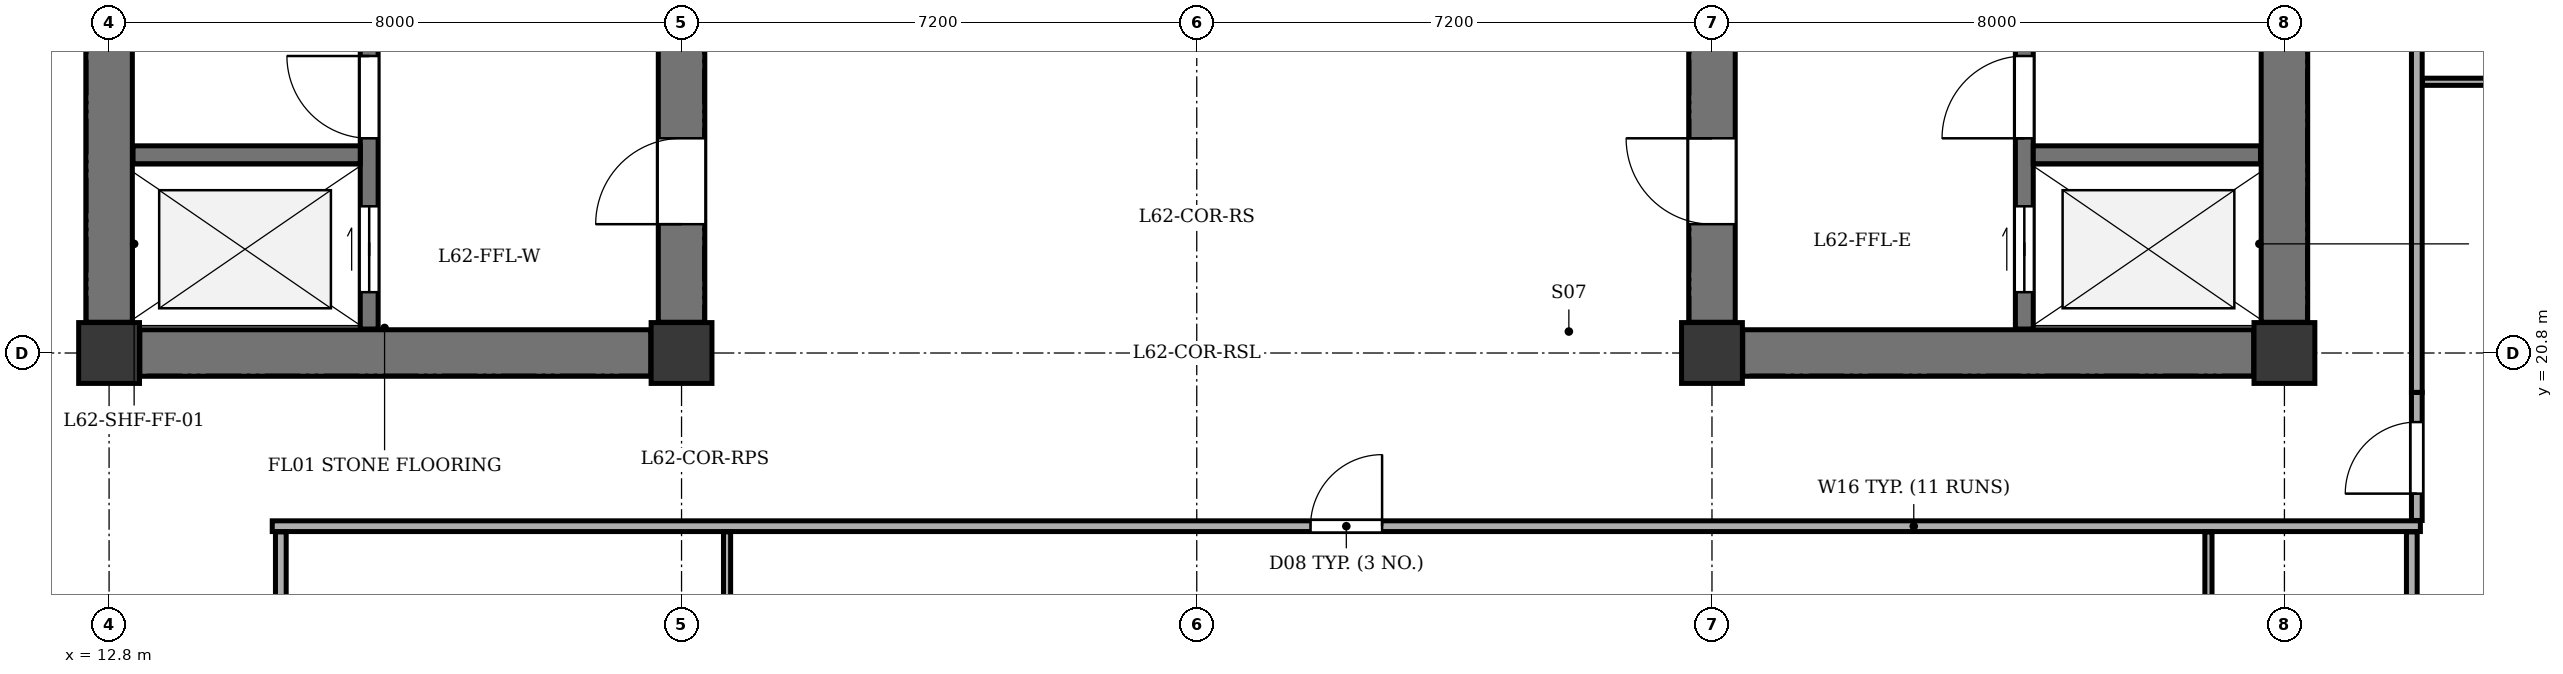
"""IFC4 building model, lengths in metres.
Left out: names, types, materials, properties, quantities, classifications, styles, units other than length and angle.
Written with IfcOpenShell. Run it as: python <this file> out.ifc"""

import sys

from ifc_helpers import new_model, si_unit, direction, frame, frame_2d, origin, origin_2d, place, context, subcontext, project, spatial, rectangle, extrude, element, fill, save


model = new_model("IFC4")
c1 = context("Model", 3, precision=1e-05, world=origin(), true_north=direction((0.0, 1.0)))
c2 = subcontext(c1, "Body", "Model", "MODEL_VIEW")
j1 = project(units=[si_unit("LENGTHUNIT", "METRE"), si_unit("PLANEANGLEUNIT", "RADIAN")], contexts=[c1])
p1 = place(None, origin())
s1 = spatial("IfcSite", under=j1, at=p1, CompositionType="ELEMENT")
p2 = place(p1, origin())
s2 = spatial("IfcBuilding", under=s1, at=p2, CompositionType="ELEMENT")
p3 = place(p2, frame((0.0, 0.0, 238.1)))
s3 = spatial("IfcBuildingStorey", under=s2, at=p3, CompositionType="ELEMENT", Elevation=238.1)
for number, where, z_axis, x_axis in (
    (1, (12.8, 20.8, 0.0), (0.0, 0.0, 1.0), (1.0, 0.0, 0.0)),
    (2, (20.8, 20.8, 0.0), (0.0, 0.0, 1.0), (1.0, 0.0, 0.0)),
    (3, (35.2, 20.8, 0.0), (0.0, 0.0, 1.0), (1.0, 0.0, 0.0)),
    (4, (43.2, 20.8, 0.0), (0.0, 0.0, 1.0), (1.0, 0.0, 0.0)),
):
    element("IfcColumn", number, at=place(p3, frame(where, z_axis=z_axis, x_axis=x_axis)), inside=s3, PredefinedType="COLUMN", context=c2, shape_type="SweptSolid", body=[
        extrude(rectangle(XDim=0.85, YDim=0.85, at=origin_2d()), origin(), (0.0, 0.0, 1.0), 3.4),
    ])
p4 = place(p3, frame((12.8, 21.23, 0.0), z_axis=(0.0, 0.0, 1.0), x_axis=(0.0, 1.0, 0.0)))
e5 = element("IfcWall", 5, at=p4, inside=s3, PredefinedType="SHEAR", context=c2, shape_type="SweptSolid", body=[
    extrude(rectangle(XDim=11.94, YDim=0.65, at=frame_2d((5.97, 0.0))), origin(), (0.0, 0.0, 1.0), 3.1),
])
p5 = place(p3, frame((13.23, 20.8, 0.0), z_axis=(0.0, 0.0, 1.0), x_axis=(1.0, 0.0, 0.0)))
e6 = element("IfcWall", 6, at=p5, inside=s3, PredefinedType="SHEAR", context=c2, shape_type="SweptSolid", body=[
    extrude(rectangle(XDim=7.14, YDim=0.65, at=frame_2d((3.57, 0.0))), origin(), (0.0, 0.0, 1.0), 3.1),
])
p6 = place(p3, frame((20.8, 21.23, 0.0), z_axis=(0.0, 0.0, 1.0), x_axis=(0.0, 1.0, 0.0)))
e7 = element("IfcWall", 7, at=p6, inside=s3, PredefinedType="SHEAR", context=c2, shape_type="SweptSolid", body=[
    extrude(rectangle(XDim=3.82, YDim=0.65, at=frame_2d((1.91, 0.0))), origin(), (0.0, 0.0, 1.0), 3.1),
])
p7 = place(p6, frame((1.37, 0.0, 0.0)))
e8 = element("IfcOpeningElement", 8, at=p7, cuts=e7, PredefinedType="OPENING", context=c2, shape_type="SweptSolid", body=[
    extrude(rectangle(XDim=1.2, YDim=2.15, at=frame_2d((0.6, 1.075))), frame((0.0, 0.335, 0.0), z_axis=(0.0, -1.0, 0.0), x_axis=(1.0, 0.0, 0.0)), (0.0, 0.0, 1.0), 0.67),
])
p8 = place(p3, frame((16.435, 21.135, 0.0), z_axis=(0.0, 0.0, 1.0), x_axis=(0.0, 1.0, 0.0)))
e9 = element("IfcWall", 9, at=p8, inside=s3, PredefinedType="SHEAR", context=c2, shape_type="SweptSolid", body=[
    extrude(rectangle(XDim=12.13, YDim=0.25, at=frame_2d((6.065, 0.0))), origin(), (0.0, 0.0, 1.0), 3.1),
])
p9 = place(p8, frame((0.515, 0.0, 0.0)))
e10 = element("IfcOpeningElement", 10, at=p9, cuts=e9, PredefinedType="OPENING", context=c2, shape_type="SweptSolid", body=[
    extrude(rectangle(XDim=1.2, YDim=2.15, at=frame_2d((0.6, 1.075))), frame((0.0, 0.135, 0.0), z_axis=(0.0, -1.0, 0.0), x_axis=(1.0, 0.0, 0.0)), (0.0, 0.0, 1.0), 0.27),
])
p10 = place(p8, frame((2.665, 0.0, 0.0)))
e11 = element("IfcOpeningElement", 11, at=p10, cuts=e9, PredefinedType="OPENING", context=c2, shape_type="SweptSolid", body=[
    extrude(rectangle(XDim=1.15, YDim=2.15, at=frame_2d((0.575, 1.075))), frame((0.0, 0.135, 0.0), z_axis=(0.0, -1.0, 0.0), x_axis=(1.0, 0.0, 0.0)), (0.0, 0.0, 1.0), 0.27),
])
p11 = place(p3, frame((13.135, 23.57, 0.0), z_axis=(0.0, 0.0, 1.0), x_axis=(1.0, 0.0, 0.0)))
e12 = element("IfcWall", 12, at=p11, inside=s3, PredefinedType="SHEAR", context=c2, shape_type="SweptSolid", body=[
    extrude(rectangle(XDim=3.175, YDim=0.25, at=frame_2d((1.587, 0.0))), origin(), (0.0, 0.0, 1.0), 3.1),
])
p12 = place(p3, frame((43.2, 21.23, 0.0), z_axis=(0.0, 0.0, 1.0), x_axis=(0.0, 1.0, 0.0)))
e13 = element("IfcWall", 13, at=p12, inside=s3, PredefinedType="SHEAR", context=c2, shape_type="SweptSolid", body=[
    extrude(rectangle(XDim=11.94, YDim=0.65, at=frame_2d((5.97, 0.0))), origin(), (0.0, 0.0, 1.0), 3.1),
])
p13 = place(p3, frame((35.63, 20.8, 0.0), z_axis=(0.0, 0.0, 1.0), x_axis=(1.0, 0.0, 0.0)))
e14 = element("IfcWall", 14, at=p13, inside=s3, PredefinedType="SHEAR", context=c2, shape_type="SweptSolid", body=[
    extrude(rectangle(XDim=7.14, YDim=0.65, at=frame_2d((3.57, 0.0))), origin(), (0.0, 0.0, 1.0), 3.1),
])
p14 = place(p3, frame((35.2, 21.23, 0.0), z_axis=(0.0, 0.0, 1.0), x_axis=(0.0, 1.0, 0.0)))
e15 = element("IfcWall", 15, at=p14, inside=s3, PredefinedType="SHEAR", context=c2, shape_type="SweptSolid", body=[
    extrude(rectangle(XDim=3.82, YDim=0.65, at=frame_2d((1.91, 0.0))), origin(), (0.0, 0.0, 1.0), 3.1),
])
p15 = place(p14, frame((1.37, 0.0, 0.0)))
e16 = element("IfcOpeningElement", 16, at=p15, cuts=e15, PredefinedType="OPENING", context=c2, shape_type="SweptSolid", body=[
    extrude(rectangle(XDim=1.2, YDim=2.15, at=frame_2d((0.6, 1.075))), frame((0.0, 0.335, 0.0), z_axis=(0.0, -1.0, 0.0), x_axis=(1.0, 0.0, 0.0)), (0.0, 0.0, 1.0), 0.67),
])
p16 = place(p3, frame((39.565, 21.135, 0.0), z_axis=(0.0, 0.0, 1.0), x_axis=(0.0, 1.0, 0.0)))
e17 = element("IfcWall", 17, at=p16, inside=s3, PredefinedType="SHEAR", context=c2, shape_type="SweptSolid", body=[
    extrude(rectangle(XDim=12.13, YDim=0.25, at=frame_2d((6.065, 0.0))), origin(), (0.0, 0.0, 1.0), 3.1),
])
p17 = place(p16, frame((0.515, 0.0, 0.0)))
e18 = element("IfcOpeningElement", 18, at=p17, cuts=e17, PredefinedType="OPENING", context=c2, shape_type="SweptSolid", body=[
    extrude(rectangle(XDim=1.2, YDim=2.15, at=frame_2d((0.6, 1.075))), frame((0.0, 0.135, 0.0), z_axis=(0.0, -1.0, 0.0), x_axis=(1.0, 0.0, 0.0)), (0.0, 0.0, 1.0), 0.27),
])
p18 = place(p16, frame((2.665, 0.0, 0.0)))
e19 = element("IfcOpeningElement", 19, at=p18, cuts=e17, PredefinedType="OPENING", context=c2, shape_type="SweptSolid", body=[
    extrude(rectangle(XDim=1.15, YDim=2.15, at=frame_2d((0.575, 1.075))), frame((0.0, 0.135, 0.0), z_axis=(0.0, -1.0, 0.0), x_axis=(1.0, 0.0, 0.0)), (0.0, 0.0, 1.0), 0.27),
])
p19 = place(p3, frame((39.69, 23.57, 0.0), z_axis=(0.0, 0.0, 1.0), x_axis=(1.0, 0.0, 0.0)))
e20 = element("IfcWall", 20, at=p19, inside=s3, PredefinedType="SHEAR", context=c2, shape_type="SweptSolid", body=[
    extrude(rectangle(XDim=3.175, YDim=0.25, at=frame_2d((1.587, 0.0))), origin(), (0.0, 0.0, 1.0), 3.1),
])
p20 = place(p3, frame((15.08, 18.38, 0.0), z_axis=(0.0, 0.0, 1.0), x_axis=(1.0, 0.0, 0.0)))
e21 = element("IfcWall", 21, at=p20, inside=s3, PredefinedType="PARTITIONING", context=c2, shape_type="SweptSolid", body=[
    extrude(rectangle(XDim=30.02, YDim=0.15, at=frame_2d((15.01, 0.0))), origin(), (0.0, 0.0, 1.0), 3.1),
])
p21 = place(p20, frame((14.51, 0.0, 0.0)))
e22 = element("IfcOpeningElement", 22, at=p21, cuts=e21, PredefinedType="OPENING", context=c2, shape_type="SweptSolid", body=[
    extrude(rectangle(XDim=1.0, YDim=2.1, at=frame_2d((0.5, 1.05))), frame((0.0, 0.085, 0.0), z_axis=(0.0, -1.0, 0.0), x_axis=(1.0, 0.0, 0.0)), (0.0, 0.0, 1.0), 0.17),
])
p22 = place(p3, frame((15.2, 3.045, 0.0), z_axis=(0.0, 0.0, 1.0), x_axis=(0.0, 1.0, 0.0)))
e23 = element("IfcWall", 23, at=p22, inside=s3, PredefinedType="PARTITIONING", context=c2, shape_type="SweptSolid", body=[
    extrude(rectangle(XDim=15.255, YDim=0.15, at=frame_2d((7.627, 0.0))), origin(), (0.0, 0.0, 1.0), 3.1),
])
p23 = place(p3, frame((42.138, 5.605, 0.0), z_axis=(0.0, 0.0, 1.0), x_axis=(0.0, 1.0, 0.0)))
e24 = element("IfcWall", 24, at=p23, inside=s3, PredefinedType="PARTITIONING", context=c2, shape_type="SweptSolid", body=[
    extrude(rectangle(XDim=12.695, YDim=0.1, at=frame_2d((6.348, 0.0))), origin(), (0.0, 0.0, 1.0), 2.725),
])
p24 = place(p23, frame((5.91, 0.0, 0.0)))
e25 = element("IfcOpeningElement", 25, at=p24, cuts=e24, PredefinedType="OPENING", context=c2, shape_type="SweptSolid", body=[
    extrude(rectangle(XDim=0.9, YDim=2.05, at=frame_2d((0.45, 1.025))), frame((0.0, 0.06, 0.0), z_axis=(0.0, -1.0, 0.0), x_axis=(1.0, 0.0, 0.0)), (0.0, 0.0, 1.0), 0.12),
])
p25 = place(p3, frame((21.436, 5.605, 0.0), z_axis=(0.0, 0.0, 1.0), x_axis=(0.0, 1.0, 0.0)))
e26 = element("IfcWall", 26, at=p25, inside=s3, PredefinedType="PARTITIONING", context=c2, shape_type="SweptSolid", body=[
    extrude(rectangle(XDim=12.695, YDim=0.1, at=frame_2d((6.348, 0.0))), origin(), (0.0, 0.0, 1.0), 3.1),
])
p26 = place(p25, frame((0.605, 0.0, 0.0)))
e27 = element("IfcOpeningElement", 27, at=p26, cuts=e26, PredefinedType="OPENING", context=c2, shape_type="SweptSolid", body=[
    extrude(rectangle(XDim=0.9, YDim=2.05, at=frame_2d((0.45, 1.025))), frame((0.0, 0.06, 0.0), z_axis=(0.0, -1.0, 0.0), x_axis=(1.0, 0.0, 0.0)), (0.0, 0.0, 1.0), 0.12),
])
p27 = place(p3, frame((44.98, 3.045, 0.0), z_axis=(0.0, 0.0, 1.0), x_axis=(0.0, 1.0, 0.0)))
e28 = element("IfcWall", 28, at=p27, inside=s3, PredefinedType="PARTITIONING", context=c2, shape_type="SweptSolid", body=[
    extrude(rectangle(XDim=15.255, YDim=0.15, at=frame_2d((7.627, 0.0))), origin(), (0.0, 0.0, 1.0), 2.725),
])
p28 = place(p3, frame((45.05, 18.46, 0.0), z_axis=(0.0, 0.0, 1.0), x_axis=(0.0, 1.0, 0.0)))
e29 = element("IfcWall", 29, at=p28, inside=s3, PredefinedType="PARTITIONING", context=c2, shape_type="SweptSolid", body=[
    extrude(rectangle(XDim=1.79, YDim=0.15, at=frame_2d((0.895, 0.0))), origin(), (0.0, 0.0, 1.0), 2.725),
])
p29 = place(p28, frame((0.375, 0.0, 0.0)))
e30 = element("IfcOpeningElement", 30, at=p29, cuts=e29, PredefinedType="OPENING", context=c2, shape_type="SweptSolid", body=[
    extrude(rectangle(XDim=1.0, YDim=2.1, at=frame_2d((0.5, 1.05))), frame((0.0, 0.085, 0.0), z_axis=(0.0, -1.0, 0.0), x_axis=(1.0, 0.0, 0.0)), (0.0, 0.0, 1.0), 0.17),
])
p30 = place(p3, frame((45.05, 20.25, 0.0), z_axis=(0.0, 0.0, 1.0), x_axis=(0.0, 1.0, 0.0)))
e31 = element("IfcWall", 31, at=p30, inside=s3, PredefinedType="PARTITIONING", context=c2, shape_type="SweptSolid", body=[
    extrude(rectangle(XDim=13.9, YDim=0.15, at=frame_2d((6.95, 0.0))), origin(), (0.0, 0.0, 1.0), 2.725),
])
p31 = place(p3, frame((45.13, 24.59, 0.0), z_axis=(0.0, 0.0, 1.0), x_axis=(1.0, 0.0, 0.0)))
e32 = element("IfcWall", 32, at=p31, inside=s3, PredefinedType="PARTITIONING", context=c2, shape_type="SweptSolid", body=[
    extrude(rectangle(XDim=10.225, YDim=0.1, at=frame_2d((5.113, 0.0))), origin(), (0.0, 0.0, 1.0), 3.1),
])
p32 = place(p31, frame((2.083, 0.0, 0.0)))
e33 = element("IfcOpeningElement", 33, at=p32, cuts=e32, PredefinedType="OPENING", context=c2, shape_type="SweptSolid", body=[
    extrude(rectangle(XDim=0.85, YDim=2.05, at=frame_2d((0.425, 1.025))), frame((0.0, 0.06, 0.0), z_axis=(0.0, -1.0, 0.0), x_axis=(1.0, 0.0, 0.0)), (0.0, 0.0, 1.0), 0.12),
])
p33 = place(p31, frame((7.078, 0.0, 0.0)))
e34 = element("IfcOpeningElement", 34, at=p33, cuts=e32, PredefinedType="OPENING", context=c2, shape_type="SweptSolid", body=[
    extrude(rectangle(XDim=0.85, YDim=2.05, at=frame_2d((0.425, 1.025))), frame((0.0, 0.06, 0.0), z_axis=(0.0, -1.0, 0.0), x_axis=(1.0, 0.0, 0.0)), (0.0, 0.0, 1.0), 0.12),
])
p34 = place(p7, origin())
e35 = element("IfcDoor", 35, at=p34, inside=s3, OperationType="SINGLE_SWING_LEFT", PredefinedType="DOOR", context=c2, shape_type="SweptSolid", body=[
    extrude(rectangle(XDim=1.2, YDim=2.15, at=frame_2d((0.6, 1.075))), frame((0.0, 0.025, 0.0), z_axis=(0.0, -1.0, 0.0), x_axis=(1.0, 0.0, 0.0)), (0.0, 0.0, 1.0), 0.05),
])
fill(e8, e35)
p35 = place(p9, origin())
e36 = element("IfcDoor", 36, at=p35, inside=s3, OperationType="DOUBLE_DOOR_SLIDING", PredefinedType="DOOR", context=c2, shape_type="SweptSolid", body=[
    extrude(rectangle(XDim=1.2, YDim=2.15, at=frame_2d((0.6, 1.075))), frame((0.0, 0.025, 0.0), z_axis=(0.0, -1.0, 0.0), x_axis=(1.0, 0.0, 0.0)), (0.0, 0.0, 1.0), 0.05),
])
fill(e10, e36)
p36 = place(p10, origin())
e37 = element("IfcDoor", 37, at=p36, inside=s3, OperationType="SINGLE_SWING_RIGHT", PredefinedType="DOOR", context=c2, shape_type="SweptSolid", body=[
    extrude(rectangle(XDim=1.15, YDim=2.15, at=frame_2d((0.575, 1.075))), frame((0.0, 0.025, 0.0), z_axis=(0.0, -1.0, 0.0), x_axis=(1.0, 0.0, 0.0)), (0.0, 0.0, 1.0), 0.05),
])
fill(e11, e37)
p37 = place(p15, origin())
e38 = element("IfcDoor", 38, at=p37, inside=s3, OperationType="SINGLE_SWING_RIGHT", PredefinedType="DOOR", context=c2, shape_type="SweptSolid", body=[
    extrude(rectangle(XDim=1.2, YDim=2.15, at=frame_2d((0.6, 1.075))), frame((0.0, 0.025, 0.0), z_axis=(0.0, -1.0, 0.0), x_axis=(1.0, 0.0, 0.0)), (0.0, 0.0, 1.0), 0.05),
])
fill(e16, e38)
p38 = place(p17, origin())
e39 = element("IfcDoor", 39, at=p38, inside=s3, OperationType="DOUBLE_DOOR_SLIDING", PredefinedType="DOOR", context=c2, shape_type="SweptSolid", body=[
    extrude(rectangle(XDim=1.2, YDim=2.15, at=frame_2d((0.6, 1.075))), frame((0.0, 0.025, 0.0), z_axis=(0.0, -1.0, 0.0), x_axis=(1.0, 0.0, 0.0)), (0.0, 0.0, 1.0), 0.05),
])
fill(e18, e39)
p39 = place(p18, origin())
e40 = element("IfcDoor", 40, at=p39, inside=s3, OperationType="SINGLE_SWING_LEFT", PredefinedType="DOOR", context=c2, shape_type="SweptSolid", body=[
    extrude(rectangle(XDim=1.15, YDim=2.15, at=frame_2d((0.575, 1.075))), frame((0.0, 0.025, 0.0), z_axis=(0.0, -1.0, 0.0), x_axis=(1.0, 0.0, 0.0)), (0.0, 0.0, 1.0), 0.05),
])
fill(e19, e40)
p40 = place(p21, origin())
e41 = element("IfcDoor", 41, at=p40, inside=s3, OperationType="SINGLE_SWING_RIGHT", PredefinedType="DOOR", context=c2, shape_type="SweptSolid", body=[
    extrude(rectangle(XDim=1.0, YDim=2.1, at=frame_2d((0.5, 1.05))), frame((0.0, 0.025, 0.0), z_axis=(0.0, -1.0, 0.0), x_axis=(1.0, 0.0, 0.0)), (0.0, 0.0, 1.0), 0.05),
])
fill(e22, e41)
p41 = place(p29, origin())
e42 = element("IfcDoor", 42, at=p41, inside=s3, OperationType="SINGLE_SWING_LEFT", PredefinedType="DOOR", context=c2, shape_type="SweptSolid", body=[
    extrude(rectangle(XDim=1.0, YDim=2.1, at=frame_2d((0.5, 1.05))), frame((0.0, 0.025, 0.0), z_axis=(0.0, -1.0, 0.0), x_axis=(1.0, 0.0, 0.0)), (0.0, 0.0, 1.0), 0.05),
])
fill(e30, e42)
save(model, sys.argv[1])
